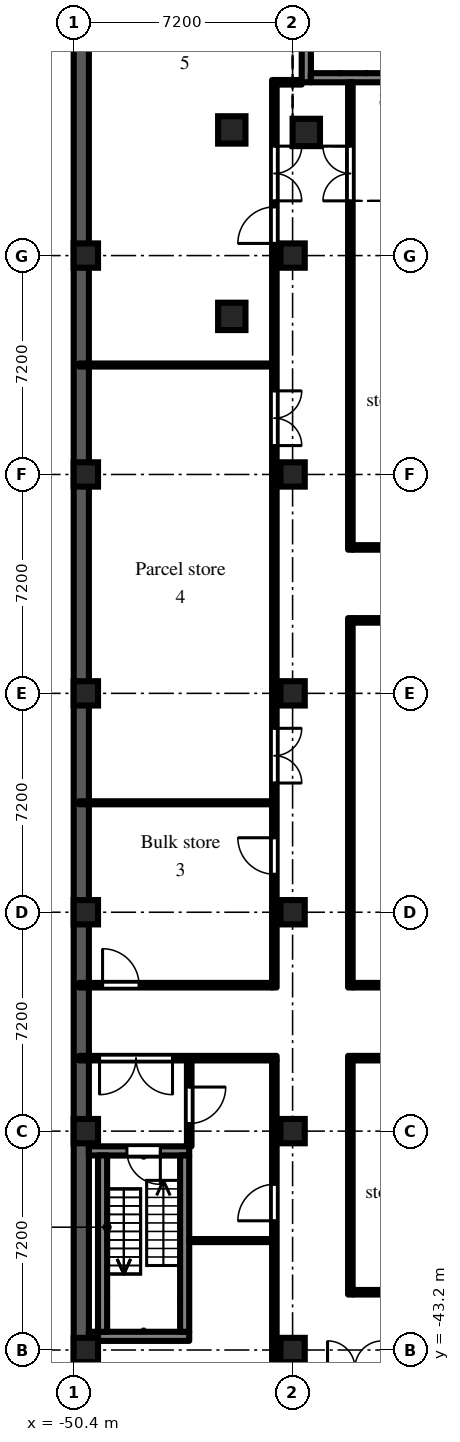
"""IFC4 building model, lengths in metres.
Left out: names, types, materials, properties, quantities, classifications, styles, units other than length and angle.
Written with IfcOpenShell. Run it as: python <this file> out.ifc"""

import sys

from ifc_helpers import new_model, si_unit, direction, frame, frame_2d, origin, origin_2d, place, context, subcontext, project, spatial, rectangle, extrude, element, fill, save


model = new_model("IFC4")
c1 = context("Model", 3, precision=1e-05, world=origin(), true_north=direction((0.0, 1.0)))
c2 = subcontext(c1, "Body", "Model", "MODEL_VIEW")
j1 = project(units=[si_unit("LENGTHUNIT", "METRE"), si_unit("PLANEANGLEUNIT", "RADIAN")], contexts=[c1])
p1 = place(None, origin())
s1 = spatial("IfcSite", under=j1, at=p1, CompositionType="ELEMENT")
p2 = place(p1, origin())
s2 = spatial("IfcBuilding", under=s1, at=p2, CompositionType="ELEMENT")
p3 = place(p2, frame((0.0, 0.0, -4.8)))
s3 = spatial("IfcBuildingStorey", under=s2, at=p3, CompositionType="ELEMENT", Elevation=-4.8)
p4 = place(p3, frame((-50.15, -49.9, -0.5), z_axis=(0.0, 0.0, 1.0), x_axis=(0.0, 1.0, 0.0)))
e1 = element("IfcWall", 1, at=p4, inside=s3, PredefinedType="SOLIDWALL", context=c2, shape_type="SweptSolid", body=[
    extrude(rectangle(XDim=99.8, YDim=0.5, at=frame_2d((49.9, 0.0))), origin(), (0.0, 0.0, 1.0), 5.3),
])
p5 = place(p3, frame((-42.75, -3.15, -0.5), z_axis=(0.0, 0.0, 1.0), x_axis=(1.0, 0.0, 0.0)))
e2 = element("IfcColumn", 2, at=p5, inside=s3, PredefinedType="COLUMN", context=c2, shape_type="SweptSolid", body=[
    extrude(rectangle(XDim=0.9, YDim=0.9, at=origin_2d()), origin(), (0.0, 0.0, 1.0), 5.3),
])
for number, where, z_axis, x_axis in (
    (3, (-50.0, -43.2, -0.5), (0.0, 0.0, 1.0), (1.0, 0.0, 0.0)),
    (4, (-50.0, -36.0, -0.5), (0.0, 0.0, 1.0), (1.0, 0.0, 0.0)),
    (5, (-50.0, -28.8, -0.5), (0.0, 0.0, 1.0), (1.0, 0.0, 0.0)),
    (6, (-50.0, -21.6, -0.5), (0.0, 0.0, 1.0), (1.0, 0.0, 0.0)),
    (7, (-50.0, -14.4, -0.5), (0.0, 0.0, 1.0), (1.0, 0.0, 0.0)),
    (8, (-50.0, -7.2, -0.5), (0.0, 0.0, 1.0), (1.0, 0.0, 0.0)),
    (9, (-43.2, -43.2, -0.5), (0.0, 0.0, 1.0), (1.0, 0.0, 0.0)),
    (10, (-43.2, -36.0, -0.5), (0.0, 0.0, 1.0), (1.0, 0.0, 0.0)),
    (11, (-43.2, -28.8, -0.5), (0.0, 0.0, 1.0), (1.0, 0.0, 0.0)),
    (12, (-43.2, -21.6, -0.5), (0.0, 0.0, 1.0), (1.0, 0.0, 0.0)),
    (13, (-43.2, -14.4, -0.5), (0.0, 0.0, 1.0), (1.0, 0.0, 0.0)),
    (14, (-43.2, -7.2, -0.5), (0.0, 0.0, 1.0), (1.0, 0.0, 0.0)),
):
    element("IfcColumn", number, at=place(p3, frame(where, z_axis=z_axis, x_axis=x_axis)), inside=s3, PredefinedType="COLUMN", context=c2, shape_type="SweptSolid", body=[
        extrude(rectangle(XDim=0.8, YDim=0.8, at=origin_2d()), origin(), (0.0, 0.0, 1.0), 5.3),
    ])
for number, where, z_axis, x_axis in (
    (15, (-45.2, -9.2, -0.5), (0.0, 0.0, 1.0), (1.0, 0.0, 0.0)),
    (16, (-45.2, -3.067, -0.5), (0.0, 0.0, 1.0), (1.0, 0.0, 0.0)),
):
    element("IfcColumn", number, at=place(p3, frame(where, z_axis=z_axis, x_axis=x_axis)), inside=s3, PredefinedType="COLUMN", context=c2, shape_type="SweptSolid", body=[
        extrude(rectangle(XDim=0.9, YDim=0.9, at=origin_2d()), origin(), (0.0, 0.0, 1.0), 5.3),
    ])
p6 = place(p3, frame((-42.75, -1.5, 0.0), z_axis=(0.0, 0.0, 1.0), x_axis=(0.0, 1.0, 0.0)))
e17 = element("IfcWall", 17, at=p6, inside=s3, PredefinedType="SHEAR", context=c2, shape_type="SweptSolid", body=[
    extrude(rectangle(XDim=3.0, YDim=0.3, at=frame_2d((1.5, 0.0))), origin(), (0.0, 0.0, 1.0), 4.35),
])
p7 = place(p3, frame((-36.8, -1.35, 0.0), z_axis=(0.0, 0.0, 1.0), x_axis=(-1.0, 0.0, 0.0)))
e18 = element("IfcWall", 18, at=p7, inside=s3, PredefinedType="SHEAR", context=c2, shape_type="SweptSolid", body=[
    extrude(rectangle(XDim=5.8, YDim=0.3, at=frame_2d((2.9, 0.0))), origin(), (0.0, 0.0, 1.0), 4.35),
])
p8 = place(p3, frame((-49.9, -36.65, 0.0), z_axis=(0.0, 0.0, 1.0), x_axis=(1.0, 0.0, 0.0)))
e19 = element("IfcWall", 19, at=p8, inside=s3, PredefinedType="SHEAR", context=c2, shape_type="SweptSolid", body=[
    extrude(rectangle(XDim=3.3, YDim=0.3, at=frame_2d((1.65, 0.0))), origin(), (0.0, 0.0, 1.0), 4.35),
])
p9 = place(p8, frame((1.25, 0.0, 0.0)))
e20 = element("IfcOpeningElement", 20, at=p9, cuts=e19, PredefinedType="OPENING", context=c2, shape_type="SweptSolid", body=[
    extrude(rectangle(XDim=1.1, YDim=2.1, at=frame_2d((0.55, 1.05))), frame((0.0, 0.16, 0.0), z_axis=(0.0, -1.0, 0.0), x_axis=(1.0, 0.0, 0.0)), (0.0, 0.0, 1.0), 0.32),
])
p10 = place(p3, frame((-49.9, -42.75, 0.0), z_axis=(0.0, 0.0, 1.0), x_axis=(1.0, 0.0, 0.0)))
e21 = element("IfcWall", 21, at=p10, inside=s3, PredefinedType="SHEAR", context=c2, shape_type="SweptSolid", body=[
    extrude(rectangle(XDim=3.3, YDim=0.3, at=frame_2d((1.65, 0.0))), origin(), (0.0, 0.0, 1.0), 4.35),
])
for number, where, z_axis, x_axis in (
    (22, (-49.45, -36.8, 0.0), (0.0, 0.0, 1.0), (0.0, -1.0, 0.0)),
    (23, (-46.75, -36.8, 0.0), (0.0, 0.0, 1.0), (0.0, -1.0, 0.0)),
):
    element("IfcWall", number, at=place(p3, frame(where, z_axis=z_axis, x_axis=x_axis)), inside=s3, PredefinedType="SHEAR", context=c2, shape_type="SweptSolid", body=[
        extrude(rectangle(XDim=5.8, YDim=0.3, at=frame_2d((2.9, 0.0))), origin(), (0.0, 0.0, 1.0), 4.35),
    ])
p11 = place(p3, frame((-50.22, -33.6, 0.0), z_axis=(0.0, 0.0, 1.0), x_axis=(1.0, 0.0, 0.0)))
e24 = element("IfcWall", 24, at=p11, inside=s3, PredefinedType="PARTITIONING", context=c2, shape_type="SweptSolid", body=[
    extrude(rectangle(XDim=6.495, YDim=0.15, at=frame_2d((3.248, 0.0))), origin(), (0.0, 0.0, 1.0), 4.35),
])
p12 = place(p11, frame((0.67, 0.0, 0.0)))
e25 = element("IfcOpeningElement", 25, at=p12, cuts=e24, PredefinedType="OPENING", context=c2, shape_type="SweptSolid", body=[
    extrude(rectangle(XDim=2.4, YDim=2.1, at=frame_2d((1.2, 1.05))), frame((0.0, 0.085, 0.0), z_axis=(0.0, -1.0, 0.0), x_axis=(1.0, 0.0, 0.0)), (0.0, 0.0, 1.0), 0.17),
])
p13 = place(p3, frame((-50.22, -31.2, 0.0), z_axis=(0.0, 0.0, 1.0), x_axis=(1.0, 0.0, 0.0)))
e26 = element("IfcWall", 26, at=p13, inside=s3, PredefinedType="PARTITIONING", context=c2, shape_type="SweptSolid", body=[
    extrude(rectangle(XDim=6.345, YDim=0.15, at=frame_2d((3.172, 0.0))), origin(), (0.0, 0.0, 1.0), 4.35),
])
p14 = place(p13, frame((0.77, 0.0, 0.0)))
e27 = element("IfcOpeningElement", 27, at=p14, cuts=e26, PredefinedType="OPENING", context=c2, shape_type="SweptSolid", body=[
    extrude(rectangle(XDim=1.2, YDim=2.1, at=frame_2d((0.6, 1.05))), frame((0.0, 0.085, 0.0), z_axis=(0.0, -1.0, 0.0), x_axis=(1.0, 0.0, 0.0)), (0.0, 0.0, 1.0), 0.17),
])
for number, where, z_axis, x_axis in (
    (28, (-50.22, -25.2, 0.0), (0.0, 0.0, 1.0), (1.0, 0.0, 0.0)),
    (29, (-50.22, -10.8, 0.0), (0.0, 0.0, 1.0), (1.0, 0.0, 0.0)),
):
    element("IfcWall", number, at=place(p3, frame(where, z_axis=z_axis, x_axis=x_axis)), inside=s3, PredefinedType="PARTITIONING", context=c2, shape_type="SweptSolid", body=[
        extrude(rectangle(XDim=6.345, YDim=0.1, at=frame_2d((3.172, 0.0))), origin(), (0.0, 0.0, 1.0), 4.35),
    ])
p15 = place(p3, frame((-46.6, -39.6, 0.0), z_axis=(0.0, 0.0, 1.0), x_axis=(1.0, 0.0, 0.0)))
e30 = element("IfcWall", 30, at=p15, inside=s3, PredefinedType="PARTITIONING", context=c2, shape_type="SweptSolid", body=[
    extrude(rectangle(XDim=2.725, YDim=0.1, at=frame_2d((1.363, 0.0))), origin(), (0.0, 0.0, 1.0), 4.35),
])
p16 = place(p3, frame((-46.6, -36.5, 0.0), z_axis=(0.0, 0.0, 1.0), x_axis=(0.0, 1.0, 0.0)))
e31 = element("IfcWall", 31, at=p16, inside=s3, PredefinedType="PARTITIONING", context=c2, shape_type="SweptSolid", body=[
    extrude(rectangle(XDim=2.825, YDim=0.15, at=frame_2d((1.413, 0.0))), origin(), (0.0, 0.0, 1.0), 4.35),
])
p17 = place(p16, frame((0.75, 0.0, 0.0)))
e32 = element("IfcOpeningElement", 32, at=p17, cuts=e31, PredefinedType="OPENING", context=c2, shape_type="SweptSolid", body=[
    extrude(rectangle(XDim=1.2, YDim=2.1, at=frame_2d((0.6, 1.05))), frame((0.0, 0.085, 0.0), z_axis=(0.0, -1.0, 0.0), x_axis=(1.0, 0.0, 0.0)), (0.0, 0.0, 1.0), 0.17),
])
p18 = place(p3, frame((-43.8, -43.875, 0.0), z_axis=(0.0, 0.0, 1.0), x_axis=(0.0, 1.0, 0.0)))
e33 = element("IfcWall", 33, at=p18, inside=s3, PredefinedType="PARTITIONING", context=c2, shape_type="SweptSolid", body=[
    extrude(rectangle(XDim=10.2, YDim=0.15, at=frame_2d((5.1, 0.0))), origin(), (0.0, 0.0, 1.0), 4.35),
])
p19 = place(p18, frame((4.925, 0.0, 0.0)))
e34 = element("IfcOpeningElement", 34, at=p19, cuts=e33, PredefinedType="OPENING", context=c2, shape_type="SweptSolid", body=[
    extrude(rectangle(XDim=1.2, YDim=2.1, at=frame_2d((0.6, 1.05))), frame((0.0, 0.085, 0.0), z_axis=(0.0, -1.0, 0.0), x_axis=(1.0, 0.0, 0.0)), (0.0, 0.0, 1.0), 0.17),
])
p20 = place(p3, frame((-43.8, -31.275, 0.0), z_axis=(0.0, 0.0, 1.0), x_axis=(0.0, 1.0, 0.0)))
e35 = element("IfcWall", 35, at=p20, inside=s3, PredefinedType="PARTITIONING", context=c2, shape_type="SweptSolid", body=[
    extrude(rectangle(XDim=29.85, YDim=0.15, at=frame_2d((14.925, 0.0))), origin(), (0.0, 0.0, 1.0), 4.35),
])
p21 = place(p20, frame((3.725, 0.0, 0.0)))
e36 = element("IfcOpeningElement", 36, at=p21, cuts=e35, PredefinedType="OPENING", context=c2, shape_type="SweptSolid", body=[
    extrude(rectangle(XDim=1.2, YDim=2.1, at=frame_2d((0.6, 1.05))), frame((0.0, 0.085, 0.0), z_axis=(0.0, -1.0, 0.0), x_axis=(1.0, 0.0, 0.0)), (0.0, 0.0, 1.0), 0.17),
])
p22 = place(p20, frame((24.475, 0.0, 0.0)))
e37 = element("IfcOpeningElement", 37, at=p22, cuts=e35, PredefinedType="OPENING", context=c2, shape_type="SweptSolid", body=[
    extrude(rectangle(XDim=1.2, YDim=2.1, at=frame_2d((0.6, 1.05))), frame((0.0, 0.085, 0.0), z_axis=(0.0, -1.0, 0.0), x_axis=(1.0, 0.0, 0.0)), (0.0, 0.0, 1.0), 0.17),
])
p23 = place(p20, frame((25.875, 0.0, 0.0)))
e38 = element("IfcOpeningElement", 38, at=p23, cuts=e35, PredefinedType="OPENING", context=c2, shape_type="SweptSolid", body=[
    extrude(rectangle(XDim=1.8, YDim=2.1, at=frame_2d((0.9, 1.05))), frame((0.0, 0.085, 0.0), z_axis=(0.0, -1.0, 0.0), x_axis=(1.0, 0.0, 0.0)), (0.0, 0.0, 1.0), 0.17),
])
p24 = place(p20, frame((6.725, 0.0, 0.0)))
e39 = element("IfcOpeningElement", 39, at=p24, cuts=e35, PredefinedType="OPENING", context=c2, shape_type="SweptSolid", body=[
    extrude(rectangle(XDim=1.8, YDim=2.1, at=frame_2d((0.9, 1.05))), frame((0.0, 0.085, 0.0), z_axis=(0.0, -1.0, 0.0), x_axis=(1.0, 0.0, 0.0)), (0.0, 0.0, 1.0), 0.17),
])
p25 = place(p20, frame((17.825, 0.0, 0.0)))
e40 = element("IfcOpeningElement", 40, at=p25, cuts=e35, PredefinedType="OPENING", context=c2, shape_type="SweptSolid", body=[
    extrude(rectangle(XDim=1.8, YDim=2.1, at=frame_2d((0.9, 1.05))), frame((0.0, 0.085, 0.0), z_axis=(0.0, -1.0, 0.0), x_axis=(1.0, 0.0, 0.0)), (0.0, 0.0, 1.0), 0.17),
])
p26 = place(p3, frame((-43.725, -1.5, 0.0), z_axis=(0.0, 0.0, 1.0), x_axis=(1.0, 0.0, 0.0)))
e41 = element("IfcWall", 41, at=p26, inside=s3, PredefinedType="PARTITIONING", context=c2, shape_type="SweptSolid", body=[
    extrude(rectangle(XDim=0.825, YDim=0.15, at=frame_2d((0.413, 0.0))), origin(), (0.0, 0.0, 1.0), 4.35),
])
p27 = place(p3, frame((-41.3, -41.375, 0.0), z_axis=(0.0, 0.0, 1.0), x_axis=(0.0, 1.0, 0.0)))
e42 = element("IfcWall", 42, at=p27, inside=s3, PredefinedType="PARTITIONING", context=c2, shape_type="SweptSolid", body=[
    extrude(rectangle(XDim=7.85, YDim=0.15, at=frame_2d((3.925, 0.0))), origin(), (0.0, 0.0, 1.0), 4.35),
])
p28 = place(p3, frame((-41.225, -41.3, 0.0), z_axis=(0.0, 0.0, 1.0), x_axis=(1.0, 0.0, 0.0)))
e43 = element("IfcWall", 43, at=p28, inside=s3, PredefinedType="PARTITIONING", context=c2, shape_type="SweptSolid", body=[
    extrude(rectangle(XDim=7.7, YDim=0.15, at=frame_2d((3.85, 0.0))), origin(), (0.0, 0.0, 1.0), 4.35),
])
p29 = place(p28, frame((2.675, 0.0, 0.0)))
e44 = element("IfcOpeningElement", 44, at=p29, cuts=e43, PredefinedType="OPENING", context=c2, shape_type="SweptSolid", body=[
    extrude(rectangle(XDim=1.2, YDim=2.1, at=frame_2d((0.6, 1.05))), frame((0.0, 0.085, 0.0), z_axis=(0.0, -1.0, 0.0), x_axis=(1.0, 0.0, 0.0)), (0.0, 0.0, 1.0), 0.17),
])
p30 = place(p3, frame((-41.225, -33.6, 0.0), z_axis=(0.0, 0.0, 1.0), x_axis=(1.0, 0.0, 0.0)))
e45 = element("IfcWall", 45, at=p30, inside=s3, PredefinedType="PARTITIONING", context=c2, shape_type="SweptSolid", body=[
    extrude(rectangle(XDim=7.7, YDim=0.15, at=frame_2d((3.85, 0.0))), origin(), (0.0, 0.0, 1.0), 4.35),
])
p31 = place(p30, frame((3.675, 0.0, 0.0)))
e46 = element("IfcOpeningElement", 46, at=p31, cuts=e45, PredefinedType="OPENING", context=c2, shape_type="SweptSolid", body=[
    extrude(rectangle(XDim=1.2, YDim=2.1, at=frame_2d((0.6, 1.05))), frame((0.0, 0.085, 0.0), z_axis=(0.0, -1.0, 0.0), x_axis=(1.0, 0.0, 0.0)), (0.0, 0.0, 1.0), 0.17),
])
p32 = place(p3, frame((-41.3, -31.275, 0.0), z_axis=(0.0, 0.0, 1.0), x_axis=(0.0, 1.0, 0.0)))
e47 = element("IfcWall", 47, at=p32, inside=s3, PredefinedType="PARTITIONING", context=c2, shape_type="SweptSolid", body=[
    extrude(rectangle(XDim=12.15, YDim=0.15, at=frame_2d((6.075, 0.0))), origin(), (0.0, 0.0, 1.0), 4.35),
])
p33 = place(p3, frame((-41.225, -31.2, 0.0), z_axis=(0.0, 0.0, 1.0), x_axis=(1.0, 0.0, 0.0)))
e48 = element("IfcWall", 48, at=p33, inside=s3, PredefinedType="PARTITIONING", context=c2, shape_type="SweptSolid", body=[
    extrude(rectangle(XDim=7.7, YDim=0.15, at=frame_2d((3.85, 0.0))), origin(), (0.0, 0.0, 1.0), 4.35),
])
p34 = place(p33, frame((2.375, 0.0, 0.0)))
e49 = element("IfcOpeningElement", 49, at=p34, cuts=e48, PredefinedType="OPENING", context=c2, shape_type="SweptSolid", body=[
    extrude(rectangle(XDim=1.8, YDim=2.1, at=frame_2d((0.9, 1.05))), frame((0.0, 0.085, 0.0), z_axis=(0.0, -1.0, 0.0), x_axis=(1.0, 0.0, 0.0)), (0.0, 0.0, 1.0), 0.17),
])
p35 = place(p3, frame((-41.225, -19.2, 0.0), z_axis=(0.0, 0.0, 1.0), x_axis=(1.0, 0.0, 0.0)))
e50 = element("IfcWall", 50, at=p35, inside=s3, PredefinedType="PARTITIONING", context=c2, shape_type="SweptSolid", body=[
    extrude(rectangle(XDim=7.7, YDim=0.15, at=frame_2d((3.85, 0.0))), origin(), (0.0, 0.0, 1.0), 4.35),
])
p36 = place(p35, frame((3.375, 0.0, 0.0)))
e51 = element("IfcOpeningElement", 51, at=p36, cuts=e50, PredefinedType="OPENING", context=c2, shape_type="SweptSolid", body=[
    extrude(rectangle(XDim=1.8, YDim=2.1, at=frame_2d((0.9, 1.05))), frame((0.0, 0.085, 0.0), z_axis=(0.0, -1.0, 0.0), x_axis=(1.0, 0.0, 0.0)), (0.0, 0.0, 1.0), 0.17),
])
p37 = place(p3, frame((-41.3, -16.875, 0.0), z_axis=(0.0, 0.0, 1.0), x_axis=(0.0, 1.0, 0.0)))
e52 = element("IfcWall", 52, at=p37, inside=s3, PredefinedType="PARTITIONING", context=c2, shape_type="SweptSolid", body=[
    extrude(rectangle(XDim=15.375, YDim=0.15, at=frame_2d((7.688, 0.0))), origin(), (0.0, 0.0, 1.0), 4.35),
])
p38 = place(p37, frame((11.475, 0.0, 0.0)))
e53 = element("IfcOpeningElement", 53, at=p38, cuts=e52, PredefinedType="OPENING", context=c2, shape_type="SweptSolid", body=[
    extrude(rectangle(XDim=1.8, YDim=2.1, at=frame_2d((0.9, 1.05))), frame((0.0, 0.085, 0.0), z_axis=(0.0, -1.0, 0.0), x_axis=(1.0, 0.0, 0.0)), (0.0, 0.0, 1.0), 0.17),
])
p39 = place(p3, frame((-41.225, -16.8, 0.0), z_axis=(0.0, 0.0, 1.0), x_axis=(1.0, 0.0, 0.0)))
e54 = element("IfcWall", 54, at=p39, inside=s3, PredefinedType="PARTITIONING", context=c2, shape_type="SweptSolid", body=[
    extrude(rectangle(XDim=7.7, YDim=0.15, at=frame_2d((3.85, 0.0))), origin(), (0.0, 0.0, 1.0), 4.35),
])
p40 = place(p39, frame((2.375, 0.0, 0.0)))
e55 = element("IfcOpeningElement", 55, at=p40, cuts=e54, PredefinedType="OPENING", context=c2, shape_type="SweptSolid", body=[
    extrude(rectangle(XDim=1.8, YDim=2.1, at=frame_2d((0.9, 1.05))), frame((0.0, 0.085, 0.0), z_axis=(0.0, -1.0, 0.0), x_axis=(1.0, 0.0, 0.0)), (0.0, 0.0, 1.0), 0.17),
])
p41 = place(p9, frame((1.1, 0.0, 0.0), z_axis=(0.0, 0.0, 1.0), x_axis=(-1.0, 0.0, 0.0)))
e56 = element("IfcDoor", 56, at=p41, inside=s3, OperationType="SINGLE_SWING_LEFT", PredefinedType="DOOR", context=c2, shape_type="SweptSolid", body=[
    extrude(rectangle(XDim=1.1, YDim=2.1, at=frame_2d((0.55, 1.05))), frame((0.0, 0.025, 0.0), z_axis=(0.0, -1.0, 0.0), x_axis=(1.0, 0.0, 0.0)), (0.0, 0.0, 1.0), 0.05),
])
fill(e20, e56)
p42 = place(p14, origin())
e57 = element("IfcDoor", 57, at=p42, inside=s3, OperationType="SINGLE_SWING_LEFT", PredefinedType="DOOR", context=c2, shape_type="SweptSolid", body=[
    extrude(rectangle(XDim=1.2, YDim=2.1, at=frame_2d((0.6, 1.05))), frame((0.0, 0.025, 0.0), z_axis=(0.0, -1.0, 0.0), x_axis=(1.0, 0.0, 0.0)), (0.0, 0.0, 1.0), 0.05),
])
fill(e27, e57)
p43 = place(p21, origin())
e58 = element("IfcDoor", 58, at=p43, inside=s3, OperationType="SINGLE_SWING_RIGHT", PredefinedType="DOOR", context=c2, shape_type="SweptSolid", body=[
    extrude(rectangle(XDim=1.2, YDim=2.1, at=frame_2d((0.6, 1.05))), frame((0.0, 0.025, 0.0), z_axis=(0.0, -1.0, 0.0), x_axis=(1.0, 0.0, 0.0)), (0.0, 0.0, 1.0), 0.05),
])
fill(e36, e58)
p44 = place(p17, frame((1.2, 0.0, 0.0), z_axis=(0.0, 0.0, 1.0), x_axis=(-1.0, 0.0, 0.0)))
e59 = element("IfcDoor", 59, at=p44, inside=s3, OperationType="SINGLE_SWING_LEFT", PredefinedType="DOOR", context=c2, shape_type="SweptSolid", body=[
    extrude(rectangle(XDim=1.2, YDim=2.1, at=frame_2d((0.6, 1.05))), frame((0.0, 0.025, 0.0), z_axis=(0.0, -1.0, 0.0), x_axis=(1.0, 0.0, 0.0)), (0.0, 0.0, 1.0), 0.05),
])
fill(e32, e59)
p45 = place(p19, origin())
e60 = element("IfcDoor", 60, at=p45, inside=s3, OperationType="SINGLE_SWING_LEFT", PredefinedType="DOOR", context=c2, shape_type="SweptSolid", body=[
    extrude(rectangle(XDim=1.2, YDim=2.1, at=frame_2d((0.6, 1.05))), frame((0.0, 0.025, 0.0), z_axis=(0.0, -1.0, 0.0), x_axis=(1.0, 0.0, 0.0)), (0.0, 0.0, 1.0), 0.05),
])
fill(e34, e60)
p46 = place(p12, frame((2.4, 0.0, 0.0), z_axis=(0.0, 0.0, 1.0), x_axis=(-1.0, 0.0, 0.0)))
e61 = element("IfcDoor", 61, at=p46, inside=s3, OperationType="DOUBLE_DOOR_DOUBLE_SWING", PredefinedType="DOOR", context=c2, shape_type="SweptSolid", body=[
    extrude(rectangle(XDim=2.4, YDim=2.1, at=frame_2d((1.2, 1.05))), frame((0.0, 0.025, 0.0), z_axis=(0.0, -1.0, 0.0), x_axis=(1.0, 0.0, 0.0)), (0.0, 0.0, 1.0), 0.05),
])
fill(e25, e61)
p47 = place(p22, origin())
e62 = element("IfcDoor", 62, at=p47, inside=s3, OperationType="SINGLE_SWING_LEFT", PredefinedType="DOOR", context=c2, shape_type="SweptSolid", body=[
    extrude(rectangle(XDim=1.2, YDim=2.1, at=frame_2d((0.6, 1.05))), frame((0.0, 0.025, 0.0), z_axis=(0.0, -1.0, 0.0), x_axis=(1.0, 0.0, 0.0)), (0.0, 0.0, 1.0), 0.05),
])
fill(e37, e62)
p48 = place(p23, frame((1.8, 0.0, 0.0), z_axis=(0.0, 0.0, 1.0), x_axis=(-1.0, 0.0, 0.0)))
e63 = element("IfcDoor", 63, at=p48, inside=s3, OperationType="DOUBLE_DOOR_DOUBLE_SWING", PredefinedType="DOOR", context=c2, shape_type="SweptSolid", body=[
    extrude(rectangle(XDim=1.8, YDim=2.1, at=frame_2d((0.9, 1.05))), frame((0.0, 0.025, 0.0), z_axis=(0.0, -1.0, 0.0), x_axis=(1.0, 0.0, 0.0)), (0.0, 0.0, 1.0), 0.05),
])
fill(e38, e63)
p49 = place(p38, origin())
e64 = element("IfcDoor", 64, at=p49, inside=s3, OperationType="DOUBLE_DOOR_DOUBLE_SWING", PredefinedType="DOOR", context=c2, shape_type="SweptSolid", body=[
    extrude(rectangle(XDim=1.8, YDim=2.1, at=frame_2d((0.9, 1.05))), frame((0.0, 0.025, 0.0), z_axis=(0.0, -1.0, 0.0), x_axis=(1.0, 0.0, 0.0)), (0.0, 0.0, 1.0), 0.05),
])
fill(e53, e64)
p50 = place(p24, frame((1.8, 0.0, 0.0), z_axis=(0.0, 0.0, 1.0), x_axis=(-1.0, 0.0, 0.0)))
e65 = element("IfcDoor", 65, at=p50, inside=s3, OperationType="DOUBLE_DOOR_DOUBLE_SWING", PredefinedType="DOOR", context=c2, shape_type="SweptSolid", body=[
    extrude(rectangle(XDim=1.8, YDim=2.1, at=frame_2d((0.9, 1.05))), frame((0.0, 0.025, 0.0), z_axis=(0.0, -1.0, 0.0), x_axis=(1.0, 0.0, 0.0)), (0.0, 0.0, 1.0), 0.05),
])
fill(e39, e65)
p51 = place(p25, frame((1.8, 0.0, 0.0), z_axis=(0.0, 0.0, 1.0), x_axis=(-1.0, 0.0, 0.0)))
e66 = element("IfcDoor", 66, at=p51, inside=s3, OperationType="DOUBLE_DOOR_DOUBLE_SWING", PredefinedType="DOOR", context=c2, shape_type="SweptSolid", body=[
    extrude(rectangle(XDim=1.8, YDim=2.1, at=frame_2d((0.9, 1.05))), frame((0.0, 0.025, 0.0), z_axis=(0.0, -1.0, 0.0), x_axis=(1.0, 0.0, 0.0)), (0.0, 0.0, 1.0), 0.05),
])
fill(e40, e66)
save(model, sys.argv[1])
